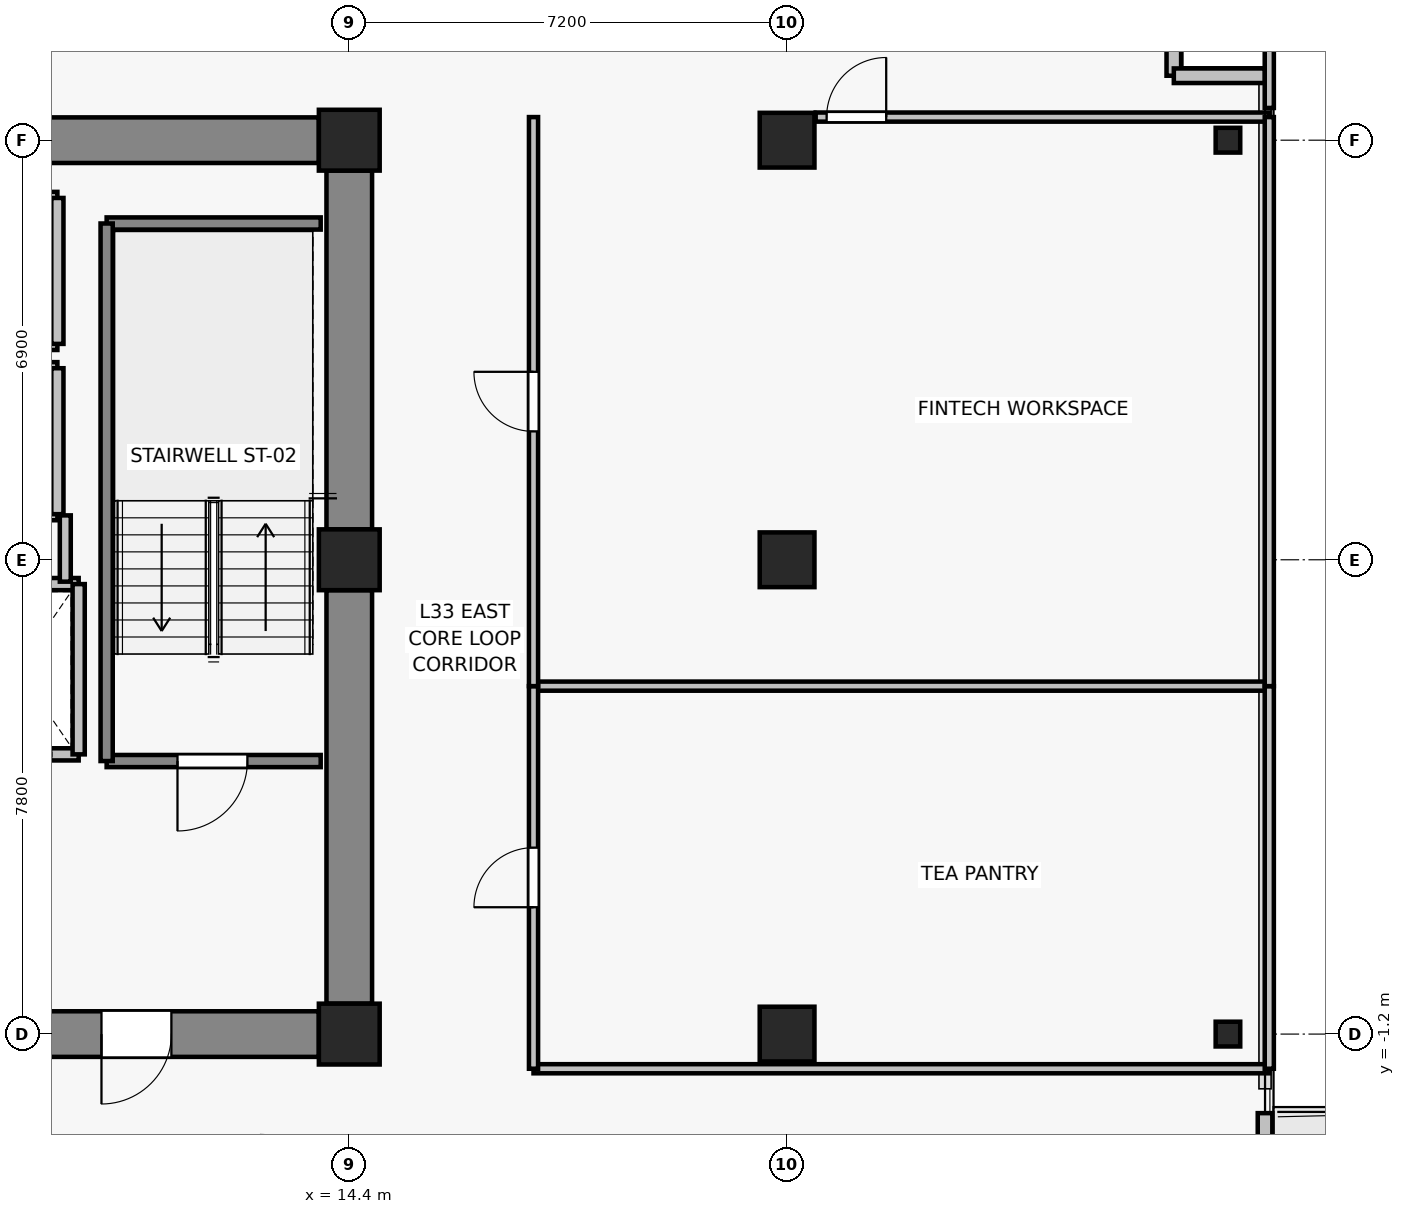
"""IFC4 building model, lengths in metres.
Left out: names, types, materials, properties, quantities, classifications, styles, units other than length and angle.
Written with IfcOpenShell. Run it as: python <this file> out.ifc"""

import sys

from ifc_helpers import new_model, si_unit, direction, frame, frame_2d, origin, origin_2d, place, context, subcontext, project, spatial, rectangle, i_section, extrude, source, transform, mapped, element, fill, save


model = new_model("IFC4")
c1 = context("Model", 3, precision=1e-05, world=origin(), true_north=direction((0.0, 1.0)))
c2 = subcontext(c1, "Body", "Model", "MODEL_VIEW")
j1 = project(units=[si_unit("LENGTHUNIT", "METRE"), si_unit("PLANEANGLEUNIT", "RADIAN")], contexts=[c1])
p1 = place(None, origin())
s1 = spatial("IfcSite", under=j1, at=p1, CompositionType="ELEMENT")
p2 = place(p1, origin())
s2 = spatial("IfcBuilding", under=s1, at=p2, CompositionType="ELEMENT")
p3 = place(p2, frame((0.0, 0.0, 119.8)))
s3 = spatial("IfcBuildingStorey", under=s2, at=p3, CompositionType="ELEMENT", Elevation=119.8)
for number, where, z_axis, x_axis in (
    (1, (14.4, -1.2, 0.0), (0.0, 0.0, 1.0), (1.0, 0.0, 0.0)),
    (2, (14.4, 6.6, 0.0), (0.0, 0.0, 1.0), (1.0, 0.0, 0.0)),
    (3, (14.4, 13.5, 0.0), (0.0, 0.0, 1.0), (1.0, 0.0, 0.0)),
):
    element("IfcColumn", number, at=place(p3, frame(where, z_axis=z_axis, x_axis=x_axis)), inside=s3, PredefinedType="COLUMN", context=c2, shape_type="SweptSolid", body=[
        extrude(rectangle(XDim=1.0, YDim=1.0, at=origin_2d()), origin(), (0.0, 0.0, 1.0), 3.3),
    ])
for number, where, z_axis, x_axis in (
    (4, (21.6, -1.2, 0.0), (0.0, 0.0, 1.0), (1.0, 0.0, 0.0)),
    (5, (21.6, 6.6, 0.0), (0.0, 0.0, 1.0), (1.0, 0.0, 0.0)),
    (6, (21.6, 13.5, 0.0), (0.0, 0.0, 1.0), (1.0, 0.0, 0.0)),
):
    element("IfcColumn", number, at=place(p3, frame(where, z_axis=z_axis, x_axis=x_axis)), inside=s3, PredefinedType="COLUMN", context=c2, shape_type="SweptSolid", body=[
        extrude(rectangle(XDim=0.9, YDim=0.9, at=origin_2d()), origin(), (0.0, 0.0, 1.0), 3.3),
    ])
for number, where, z_axis, x_axis in (
    (7, (28.85, -1.2, 0.0), (0.0, 0.0, 1.0), (1.0, 0.0, 0.0)),
    (8, (28.85, 13.5, 0.0), (0.0, 0.0, 1.0), (1.0, 0.0, 0.0)),
):
    element("IfcColumn", number, at=place(p3, frame(where, z_axis=z_axis, x_axis=x_axis)), inside=s3, PredefinedType="COLUMN", context=c2, shape_type="SweptSolid", body=[
        extrude(i_section(OverallWidth=0.404, OverallDepth=0.407, WebThickness=0.022, FlangeThickness=0.032, FilletRadius=0.015, at=origin_2d()), origin(), (0.0, 0.0, 1.0), 3.3),
    ])
p4 = place(p3, frame((7.7, 13.5, 0.0), z_axis=(0.0, 0.0, 1.0), x_axis=(1.0, 0.0, 0.0)))
e9 = element("IfcWall", 9, at=p4, inside=s3, PredefinedType="SHEAR", context=c2, shape_type="SweptSolid", body=[
    extrude(rectangle(XDim=6.2, YDim=0.75, at=frame_2d((3.1, 0.0))), origin(), (0.0, 0.0, 1.0), 3.075),
])
p5 = place(p3, frame((14.4, -0.7, 0.0), z_axis=(0.0, 0.0, 1.0), x_axis=(0.0, 1.0, 0.0)))
e10 = element("IfcWall", 10, at=p5, inside=s3, PredefinedType="SHEAR", context=c2, shape_type="SweptSolid", body=[
    extrude(rectangle(XDim=6.8, YDim=0.75, at=frame_2d((3.4, 0.0))), origin(), (0.0, 0.0, 1.0), 3.075),
])
p6 = place(p3, frame((14.4, 7.1, 0.0), z_axis=(0.0, 0.0, 1.0), x_axis=(0.0, 1.0, 0.0)))
e11 = element("IfcWall", 11, at=p6, inside=s3, PredefinedType="SHEAR", context=c2, shape_type="SweptSolid", body=[
    extrude(rectangle(XDim=5.9, YDim=0.75, at=frame_2d((2.95, 0.0))), origin(), (0.0, 0.0, 1.0), 3.075),
])
p7 = place(p3, frame((13.9, -1.2, 0.0), z_axis=(0.0, 0.0, 1.0), x_axis=(-1.0, 0.0, 0.0)))
e12 = element("IfcWall", 12, at=p7, inside=s3, PredefinedType="SHEAR", context=c2, shape_type="SweptSolid", body=[
    extrude(rectangle(XDim=6.2, YDim=0.75, at=frame_2d((3.1, 0.0))), origin(), (0.0, 0.0, 1.0), 3.075),
])
p8 = place(p7, frame((2.425, 0.0, 0.0)))
e13 = element("IfcOpeningElement", 13, at=p8, cuts=e12, PredefinedType="OPENING", context=c2, shape_type="SweptSolid", body=[
    extrude(rectangle(XDim=1.15, YDim=2.15, at=frame_2d((0.575, 1.075))), frame((0.0, 0.385, 0.0), z_axis=(0.0, -1.0, 0.0), x_axis=(1.0, 0.0, 0.0)), (0.0, 0.0, 1.0), 0.77),
])
p9 = place(p3, frame((29.46, -2.5, 0.0), z_axis=(0.0, 0.0, 1.0), x_axis=(0.0, -1.0, 0.0)))
e14 = element("IfcWall", 14, at=p9, inside=s3, PredefinedType="SOLIDWALL", context=c2, shape_type="SweptSolid", body=[
    extrude(rectangle(XDim=5.8, YDim=0.24, at=frame_2d((2.9, 0.0))), origin(), (0.0, 0.0, 1.0), 3.075),
])
p10 = place(p9, frame((1.566, 0.0, 0.0)))
e15 = element("IfcOpeningElement", 15, at=p10, cuts=e14, PredefinedType="OPENING", context=c2, shape_type="SweptSolid", body=[
    extrude(rectangle(XDim=1.0, YDim=2.2, at=frame_2d((0.5, 1.1))), frame((0.0, 0.13, 0.0), z_axis=(0.0, -1.0, 0.0), x_axis=(1.0, 0.0, 0.0)), (0.0, 0.0, 1.0), 0.26),
])
p11 = place(p9, frame((2.916, 0.0, 0.85)))
e16 = element("IfcOpeningElement", 16, at=p11, cuts=e14, PredefinedType="OPENING", context=c2, shape_type="SweptSolid", body=[
    extrude(rectangle(XDim=1.5, YDim=1.6, at=frame_2d((0.75, 0.8))), frame((0.0, 0.13, 0.0), z_axis=(0.0, -1.0, 0.0), x_axis=(1.0, 0.0, 0.0)), (0.0, 0.0, 1.0), 0.26),
])
for number, where, z_axis, x_axis in (
    (17, (27.96, 14.56, 0.0), (0.0, 0.0, 1.0), (0.0, 1.0, 0.0)),
    (18, (29.46, 14.56, 0.0), (0.0, 0.0, 1.0), (-1.0, 0.0, 0.0)),
):
    element("IfcWall", number, at=place(p3, frame(where, z_axis=z_axis, x_axis=x_axis)), inside=s3, PredefinedType="SOLIDWALL", context=c2, shape_type="SweptSolid", body=[
        extrude(rectangle(XDim=1.5, YDim=0.24, at=frame_2d((0.75, 0.0))), origin(), (0.0, 0.0, 1.0), 3.075),
    ])
p12 = place(p3, frame((9.95, 3.4, 0.0), z_axis=(0.0, 0.0, 1.0), x_axis=(-1.0, 0.0, 0.0)))
e19 = element("IfcWall", 19, at=p12, inside=s3, PredefinedType="SOLIDWALL", context=c2, shape_type="SweptSolid", body=[
    extrude(rectangle(XDim=2.0, YDim=0.2, at=frame_2d((1.0, 0.0))), origin(), (0.0, 0.0, 1.0), 3.075),
])
p13 = place(p12, frame((0.45, 0.0, 0.0)))
e20 = element("IfcOpeningElement", 20, at=p13, cuts=e19, PredefinedType="OPENING", context=c2, shape_type="SweptSolid", body=[
    extrude(rectangle(XDim=1.1, YDim=2.2, at=frame_2d((0.55, 1.1))), frame((0.0, 0.11, 0.0), z_axis=(0.0, -1.0, 0.0), x_axis=(1.0, 0.0, 0.0)), (0.0, 0.0, 1.0), 0.22),
])
p14 = place(p3, frame((7.95, 6.2, 0.0), z_axis=(0.0, 0.0, 1.0), x_axis=(1.0, 0.0, 0.0)))
e21 = element("IfcWall", 21, at=p14, inside=s3, PredefinedType="SOLIDWALL", context=c2, shape_type="SweptSolid", body=[
    extrude(rectangle(XDim=2.0, YDim=0.2, at=frame_2d((1.0, 0.0))), origin(), (0.0, 0.0, 1.0), 3.075),
])
p15 = place(p3, frame((9.95, 6.2, 0.0), z_axis=(0.0, 0.0, 1.0), x_axis=(0.0, -1.0, 0.0)))
e22 = element("IfcWall", 22, at=p15, inside=s3, PredefinedType="SOLIDWALL", context=c2, shape_type="SweptSolid", body=[
    extrude(rectangle(XDim=2.8, YDim=0.2, at=frame_2d((1.4, 0.0))), origin(), (0.0, 0.0, 1.0), 3.075),
])
for number, where, z_axis, x_axis in (
    (23, (9.6, 7.35, 0.0), (0.0, 0.0, 1.0), (-1.0, 0.0, 0.0)),
    (24, (7.4, 9.75, 0.0), (0.0, 0.0, 1.0), (1.0, 0.0, 0.0)),
):
    element("IfcWall", number, at=place(p3, frame(where, z_axis=z_axis, x_axis=x_axis)), inside=s3, PredefinedType="SOLIDWALL", context=c2, shape_type="SweptSolid", body=[
        extrude(rectangle(XDim=2.2, YDim=0.2, at=frame_2d((1.1, 0.0))), origin(), (0.0, 0.0, 1.0), 2.515),
    ])
p16 = place(p3, frame((9.6, 9.75, 0.0), z_axis=(0.0, 0.0, 1.0), x_axis=(0.0, -1.0, 0.0)))
e25 = element("IfcWall", 25, at=p16, inside=s3, PredefinedType="SOLIDWALL", context=c2, shape_type="SweptSolid", body=[
    extrude(rectangle(XDim=2.4, YDim=0.2, at=frame_2d((1.2, 0.0))), origin(), (0.0, 0.0, 1.0), 3.075),
])
for number, where, z_axis, x_axis in (
    (26, (9.6, 10.15, 0.0), (0.0, 0.0, 1.0), (-1.0, 0.0, 0.0)),
    (27, (7.4, 12.55, 0.0), (0.0, 0.0, 1.0), (1.0, 0.0, 0.0)),
):
    element("IfcWall", number, at=place(p3, frame(where, z_axis=z_axis, x_axis=x_axis)), inside=s3, PredefinedType="SOLIDWALL", context=c2, shape_type="SweptSolid", body=[
        extrude(rectangle(XDim=2.2, YDim=0.2, at=frame_2d((1.1, 0.0))), origin(), (0.0, 0.0, 1.0), 2.515),
    ])
p17 = place(p3, frame((9.6, 12.55, 0.0), z_axis=(0.0, 0.0, 1.0), x_axis=(0.0, -1.0, 0.0)))
e28 = element("IfcWall", 28, at=p17, inside=s3, PredefinedType="SOLIDWALL", context=c2, shape_type="SweptSolid", body=[
    extrude(rectangle(XDim=2.4, YDim=0.2, at=frame_2d((1.2, 0.0))), origin(), (0.0, 0.0, 1.0), 3.075),
])
p18 = place(p3, frame((13.93, 3.29, 0.0), z_axis=(0.0, 0.0, 1.0), x_axis=(-1.0, 0.0, 0.0)))
e29 = element("IfcWall", 29, at=p18, inside=s3, PredefinedType="SOLIDWALL", context=c2, shape_type="SweptSolid", body=[
    extrude(rectangle(XDim=3.52, YDim=0.2, at=frame_2d((1.76, 0.0))), origin(), (0.0, 0.0, 1.0), 3.075),
])
p19 = place(p18, frame((1.205, 0.0, 0.0)))
e30 = element("IfcOpeningElement", 30, at=p19, cuts=e29, PredefinedType="OPENING", context=c2, shape_type="SweptSolid", body=[
    extrude(rectangle(XDim=1.15, YDim=2.15, at=frame_2d((0.575, 1.075))), frame((0.0, 0.11, 0.0), z_axis=(0.0, -1.0, 0.0), x_axis=(1.0, 0.0, 0.0)), (0.0, 0.0, 1.0), 0.22),
])
p20 = place(p3, frame((10.41, 12.13, 0.0), z_axis=(0.0, 0.0, 1.0), x_axis=(1.0, 0.0, 0.0)))
e31 = element("IfcWall", 31, at=p20, inside=s3, PredefinedType="SOLIDWALL", context=c2, shape_type="SweptSolid", body=[
    extrude(rectangle(XDim=3.52, YDim=0.2, at=frame_2d((1.76, 0.0))), origin(), (0.0, 0.0, 1.0), 3.075),
])
p21 = place(p3, frame((10.41, 3.29, 0.0), z_axis=(0.0, 0.0, 1.0), x_axis=(0.0, 1.0, 0.0)))
e32 = element("IfcWall", 32, at=p21, inside=s3, PredefinedType="SOLIDWALL", context=c2, shape_type="SweptSolid", body=[
    extrude(rectangle(XDim=8.84, YDim=0.2, at=frame_2d((4.42, 0.0))), origin(), (0.0, 0.0, 1.0), 3.075),
])
p22 = place(p3, frame((9.73, 7.33, 0.0), z_axis=(0.0, 0.0, 1.0), x_axis=(0.0, -1.0, 0.0)))
e33 = element("IfcWall", 33, at=p22, inside=s3, PredefinedType="PARTITIONING", context=c2, shape_type="SweptSolid", body=[
    extrude(rectangle(XDim=1.09, YDim=0.18, at=frame_2d((0.545, 0.0))), origin(), (0.0, 0.0, 1.0), 3.075),
])
for number, where, z_axis, x_axis in (
    (34, (29.53, -1.77, 0.0), (0.0, 0.0, 1.0), (-1.0, 0.0, 0.0)),
    (35, (17.43, 4.522, 0.0), (0.0, 0.0, 1.0), (1.0, 0.0, 0.0)),
):
    element("IfcWall", number, at=place(p3, frame(where, z_axis=z_axis, x_axis=x_axis)), inside=s3, PredefinedType="PARTITIONING", context=c2, shape_type="SweptSolid", body=[
        extrude(rectangle(XDim=12.1, YDim=0.15, at=frame_2d((6.05, 0.0))), origin(), (0.0, 0.0, 1.0), 2.515),
    ])
p23 = place(p3, frame((17.43, -1.77, 0.0), z_axis=(0.0, 0.0, 1.0), x_axis=(0.0, 1.0, 0.0)))
e36 = element("IfcWall", 36, at=p23, inside=s3, PredefinedType="PARTITIONING", context=c2, shape_type="SweptSolid", body=[
    extrude(rectangle(XDim=6.292, YDim=0.15, at=frame_2d((3.146, 0.0))), origin(), (0.0, 0.0, 1.0), 2.515),
])
p24 = place(p23, frame((2.656, 0.0, 0.0)))
e37 = element("IfcOpeningElement", 37, at=p24, cuts=e36, PredefinedType="OPENING", context=c2, shape_type="SweptSolid", body=[
    extrude(rectangle(XDim=0.98, YDim=2.15, at=frame_2d((0.49, 1.075))), frame((0.0, 0.085, 0.0), z_axis=(0.0, -1.0, 0.0), x_axis=(1.0, 0.0, 0.0)), (0.0, 0.0, 1.0), 0.17),
])
p25 = place(p3, frame((29.53, 4.522, 0.0), z_axis=(0.0, 0.0, 1.0), x_axis=(0.0, -1.0, 0.0)))
e38 = element("IfcWall", 38, at=p25, inside=s3, PredefinedType="PARTITIONING", context=c2, shape_type="SweptSolid", body=[
    extrude(rectangle(XDim=6.292, YDim=0.15, at=frame_2d((3.146, 0.0))), origin(), (0.0, 0.0, 1.0), 3.075),
])
p26 = place(p3, frame((22.07, 13.88, 0.0), z_axis=(0.0, 0.0, 1.0), x_axis=(1.0, 0.0, 0.0)))
e39 = element("IfcWall", 39, at=p26, inside=s3, PredefinedType="PARTITIONING", context=c2, shape_type="SweptSolid", body=[
    extrude(rectangle(XDim=7.46, YDim=0.15, at=frame_2d((3.73, 0.0))), origin(), (0.0, 0.0, 1.0), 3.075),
])
p27 = place(p26, frame((0.18, 0.0, 0.0)))
e40 = element("IfcOpeningElement", 40, at=p27, cuts=e39, PredefinedType="OPENING", context=c2, shape_type="SweptSolid", body=[
    extrude(rectangle(XDim=0.98, YDim=2.15, at=frame_2d((0.49, 1.075))), frame((0.0, 0.085, 0.0), z_axis=(0.0, -1.0, 0.0), x_axis=(1.0, 0.0, 0.0)), (0.0, 0.0, 1.0), 0.17),
])
p28 = place(p3, frame((17.43, 4.522, 0.0), z_axis=(0.0, 0.0, 1.0), x_axis=(0.0, 1.0, 0.0)))
e41 = element("IfcWall", 41, at=p28, inside=s3, PredefinedType="PARTITIONING", context=c2, shape_type="SweptSolid", body=[
    extrude(rectangle(XDim=9.358, YDim=0.15, at=frame_2d((4.679, 0.0))), origin(), (0.0, 0.0, 1.0), 2.515),
])
p29 = place(p28, frame((4.189, 0.0, 0.0)))
e42 = element("IfcOpeningElement", 42, at=p29, cuts=e41, PredefinedType="OPENING", context=c2, shape_type="SweptSolid", body=[
    extrude(rectangle(XDim=0.98, YDim=2.15, at=frame_2d((0.49, 1.075))), frame((0.0, 0.085, 0.0), z_axis=(0.0, -1.0, 0.0), x_axis=(1.0, 0.0, 0.0)), (0.0, 0.0, 1.0), 0.17),
])
p30 = place(p3, frame((29.53, 13.88, 0.0), z_axis=(0.0, 0.0, 1.0), x_axis=(0.0, -1.0, 0.0)))
e43 = element("IfcWall", 43, at=p30, inside=s3, PredefinedType="PARTITIONING", context=c2, shape_type="SweptSolid", body=[
    extrude(rectangle(XDim=9.358, YDim=0.15, at=frame_2d((4.679, 0.0))), origin(), (0.0, 0.0, 1.0), 3.075),
])
p31 = place(p3, frame((29.53, 17.63, 0.0), z_axis=(0.0, 0.0, 1.0), x_axis=(0.0, -1.0, 0.0)))
e44 = element("IfcWall", 44, at=p31, inside=s3, PredefinedType="PARTITIONING", context=c2, shape_type="SweptSolid", body=[
    extrude(rectangle(XDim=3.6, YDim=0.15, at=frame_2d((1.8, 0.0))), origin(), (0.0, 0.0, 1.0), 3.075),
])
m1 = source(origin(), c2, "Body", "SweptSolid", [
    extrude(rectangle(XDim=1.15, YDim=2.15, at=frame_2d((0.575, 1.075))), frame((0.0, 0.025, 0.0), z_axis=(0.0, -1.0, 0.0), x_axis=(1.0, 0.0, 0.0)), (0.0, 0.0, 1.0), 0.05),
])
p32 = place(p19, origin())
e45 = element("IfcDoor", 45, at=p32, inside=s3, OperationType="SINGLE_SWING_RIGHT", PredefinedType="DOOR", context=c2, shape_type="MappedRepresentation", body=[
    mapped(m1, transform((0.0, 0.0, 0.0), x_axis=(1.0, 0.0, 0.0), y_axis=(0.0, 1.0, 0.0), z_axis=(0.0, 0.0, 1.0), scale=1.0)),
])
fill(e30, e45)
p33 = place(p8, origin())
e46 = element("IfcDoor", 46, at=p33, inside=s3, OperationType="SINGLE_SWING_RIGHT", PredefinedType="DOOR", context=c2, shape_type="MappedRepresentation", body=[
    mapped(m1, transform((0.0, 0.0, 0.0), x_axis=(1.0, 0.0, 0.0), y_axis=(0.0, 1.0, 0.0), z_axis=(0.0, 0.0, 1.0), scale=1.0)),
])
fill(e13, e46)
m2 = source(origin(), c2, "Body", "SweptSolid", [
    extrude(rectangle(XDim=0.98, YDim=2.15, at=frame_2d((0.49, 1.075))), frame((0.0, 0.025, 0.0), z_axis=(0.0, -1.0, 0.0), x_axis=(1.0, 0.0, 0.0)), (0.0, 0.0, 1.0), 0.05),
])
p34 = place(p24, origin())
e47 = element("IfcDoor", 47, at=p34, inside=s3, OperationType="SINGLE_SWING_LEFT", PredefinedType="DOOR", context=c2, shape_type="MappedRepresentation", body=[
    mapped(m2, transform((0.0, 0.0, 0.0), x_axis=(1.0, 0.0, 0.0), y_axis=(0.0, 1.0, 0.0), z_axis=(0.0, 0.0, 1.0), scale=1.0)),
])
fill(e37, e47)
p35 = place(p29, origin())
e48 = element("IfcDoor", 48, at=p35, inside=s3, OperationType="SINGLE_SWING_RIGHT", PredefinedType="DOOR", context=c2, shape_type="MappedRepresentation", body=[
    mapped(m2, transform((0.0, 0.0, 0.0), x_axis=(1.0, 0.0, 0.0), y_axis=(0.0, 1.0, 0.0), z_axis=(0.0, 0.0, 1.0), scale=1.0)),
])
fill(e42, e48)
p36 = place(p27, origin())
e49 = element("IfcDoor", 49, at=p36, inside=s3, OperationType="SINGLE_SWING_RIGHT", PredefinedType="DOOR", context=c2, shape_type="MappedRepresentation", body=[
    mapped(m2, transform((0.0, 0.0, 0.0), x_axis=(1.0, 0.0, 0.0), y_axis=(0.0, 1.0, 0.0), z_axis=(0.0, 0.0, 1.0), scale=1.0)),
])
fill(e40, e49)
save(model, sys.argv[1])
